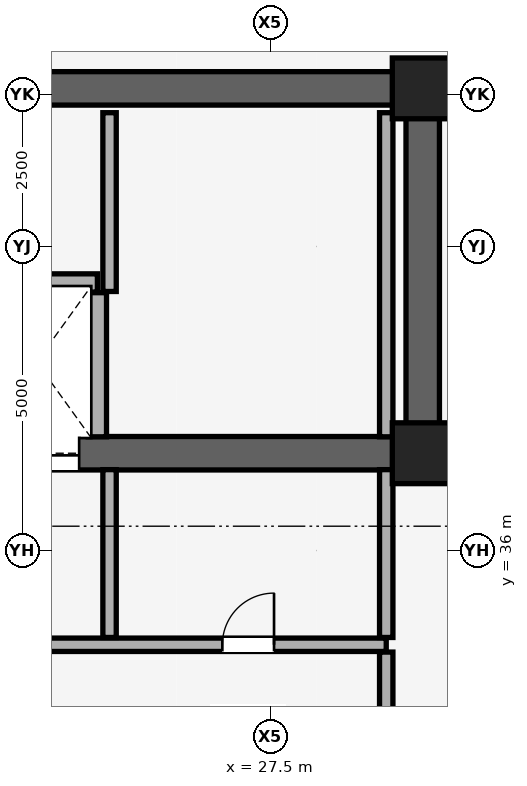
"""IFC4 building model, lengths in metres.
Left out: names, types, materials, properties, quantities, classifications, styles, units other than length and angle.
Written with IfcOpenShell. Run it as: python <this file> out.ifc"""

import sys

from ifc_helpers import new_model, si_unit, direction, frame, frame_2d, origin, origin_2d, place, context, subcontext, project, spatial, rectangle, extrude, element, fill, save


model = new_model("IFC4")
c1 = context("Model", 3, precision=1e-05, world=origin(), true_north=direction((0.0, 1.0)))
c2 = subcontext(c1, "Body", "Model", "MODEL_VIEW")
j1 = project(units=[si_unit("LENGTHUNIT", "METRE"), si_unit("PLANEANGLEUNIT", "RADIAN")], contexts=[c1])
p1 = place(None, origin())
s1 = spatial("IfcSite", under=j1, at=p1, CompositionType="ELEMENT")
p2 = place(p1, origin())
s2 = spatial("IfcBuilding", under=s1, at=p2, CompositionType="ELEMENT")
p3 = place(p2, frame((0.0, 0.0, 147.8)))
s3 = spatial("IfcBuildingStorey", under=s2, at=p3, CompositionType="ELEMENT", Elevation=147.8)
for number, where, z_axis, x_axis in (
    (1, (30.0, 37.6, 0.0), (0.0, 0.0, 1.0), (1.0, 0.0, 0.0)),
    (2, (30.0, 43.6, 0.0), (0.0, 0.0, 1.0), (1.0, 0.0, 0.0)),
):
    element("IfcColumn", number, at=place(p3, frame(where, z_axis=z_axis, x_axis=x_axis)), inside=s3, PredefinedType="COLUMN", context=c2, shape_type="SweptSolid", body=[
        extrude(rectangle(XDim=1.0, YDim=1.0, at=origin_2d()), origin(), (0.0, 0.0, 1.0), 6.6),
    ])
p4 = place(p3, frame((11.0, 43.6, 0.0), z_axis=(0.0, 0.0, 1.0), x_axis=(1.0, 0.0, 0.0)))
e3 = element("IfcWall", 3, at=p4, inside=s3, PredefinedType="SHEAR", context=c2, shape_type="SweptSolid", body=[
    extrude(rectangle(XDim=19.0, YDim=0.55, at=frame_2d((9.5, 0.0))), origin(), (0.0, 0.0, 1.0), 6.4),
])
p5 = place(p3, frame((30.0, 37.6, 0.0), z_axis=(0.0, 0.0, 1.0), x_axis=(0.0, 1.0, 0.0)))
e4 = element("IfcWall", 4, at=p5, inside=s3, PredefinedType="SHEAR", context=c2, shape_type="SweptSolid", body=[
    extrude(rectangle(XDim=6.0, YDim=0.55, at=frame_2d((3.0, 0.0))), origin(), (0.0, 0.0, 1.0), 6.4),
])
p6 = place(p3, frame((11.0, 37.6, 0.0), z_axis=(0.0, 0.0, 1.0), x_axis=(1.0, 0.0, 0.0)))
e5 = element("IfcWall", 5, at=p6, inside=s3, PredefinedType="SHEAR", context=c2, shape_type="SweptSolid", body=[
    extrude(rectangle(XDim=19.0, YDim=0.55, at=frame_2d((9.5, 0.0))), origin(), (0.0, 0.0, 1.0), 6.4),
])
p7 = place(p6, frame((1.06, 0.0, 0.0)))
e6 = element("IfcOpeningElement", 6, at=p7, cuts=e5, PredefinedType="OPENING", context=c2, shape_type="SweptSolid", body=[
    extrude(rectangle(XDim=1.15, YDim=2.2, at=frame_2d((0.575, 1.1))), frame((0.0, 0.285, 0.0), z_axis=(0.0, -1.0, 0.0), x_axis=(1.0, 0.0, 0.0)), (0.0, 0.0, 1.0), 0.57),
])
p8 = place(p6, frame((9.55, 0.0, 0.0)))
e7 = element("IfcOpeningElement", 7, at=p8, cuts=e5, PredefinedType="OPENING", context=c2, shape_type="SweptSolid", body=[
    extrude(rectangle(XDim=1.4, YDim=2.35, at=frame_2d((0.7, 1.175))), frame((0.0, 0.285, 0.0), z_axis=(0.0, -1.0, 0.0), x_axis=(1.0, 0.0, 0.0)), (0.0, 0.0, 1.0), 0.57),
])
p9 = place(p6, frame((11.95, 0.0, 0.0)))
e8 = element("IfcOpeningElement", 8, at=p9, cuts=e5, PredefinedType="OPENING", context=c2, shape_type="SweptSolid", body=[
    extrude(rectangle(XDim=1.4, YDim=2.35, at=frame_2d((0.7, 1.175))), frame((0.0, 0.285, 0.0), z_axis=(0.0, -1.0, 0.0), x_axis=(1.0, 0.0, 0.0)), (0.0, 0.0, 1.0), 0.57),
])
p10 = place(p3, frame((16.64, 34.45, 0.0), z_axis=(0.0, 0.0, 1.0), x_axis=(1.0, 0.0, 0.0)))
e9 = element("IfcWall", 9, at=p10, inside=s3, PredefinedType="SOLIDWALL", context=c2, shape_type="SweptSolid", body=[
    extrude(rectangle(XDim=12.76, YDim=0.22, at=frame_2d((6.38, 0.0))), origin(), (0.0, 0.0, 1.0), 5.975),
])
p11 = place(p10, frame((5.21, 0.0, 0.0)))
e10 = element("IfcOpeningElement", 10, at=p11, cuts=e9, PredefinedType="OPENING", context=c2, shape_type="SweptSolid", body=[
    extrude(rectangle(XDim=1.2, YDim=2.25, at=frame_2d((0.6, 1.125))), frame((0.0, 0.12, 0.0), z_axis=(0.0, -1.0, 0.0), x_axis=(1.0, 0.0, 0.0)), (0.0, 0.0, 1.0), 0.24),
])
p12 = place(p10, frame((10.065, 0.0, 0.0)))
e11 = element("IfcOpeningElement", 11, at=p12, cuts=e9, PredefinedType="OPENING", context=c2, shape_type="SweptSolid", body=[
    extrude(rectangle(XDim=0.85, YDim=2.01, at=frame_2d((0.425, 1.005))), frame((0.0, 0.12, 0.0), z_axis=(0.0, -1.0, 0.0), x_axis=(1.0, 0.0, 0.0)), (0.0, 0.0, 1.0), 0.24),
])
p13 = place(p10, frame((1.25, 0.0, 0.0)))
e12 = element("IfcOpeningElement", 12, at=p13, cuts=e9, PredefinedType="OPENING", context=c2, shape_type="SweptSolid", body=[
    extrude(rectangle(XDim=0.85, YDim=2.01, at=frame_2d((0.425, 1.005))), frame((0.0, 0.12, 0.0), z_axis=(0.0, -1.0, 0.0), x_axis=(1.0, 0.0, 0.0)), (0.0, 0.0, 1.0), 0.24),
])
p14 = place(p3, frame((20.25, 40.4, 0.0), z_axis=(0.0, 0.0, 1.0), x_axis=(1.0, 0.0, 0.0)))
e13 = element("IfcWall", 13, at=p14, inside=s3, PredefinedType="SOLIDWALL", context=c2, shape_type="SweptSolid", body=[
    extrude(rectangle(XDim=4.4, YDim=0.3, at=frame_2d((2.2, 0.0))), origin(), (0.0, 0.0, 1.0), 6.4),
])
p15 = place(p3, frame((24.65, 37.87, 0.0), z_axis=(0.0, 0.0, 1.0), x_axis=(0.0, 1.0, 0.0)))
e14 = element("IfcWall", 14, at=p15, inside=s3, PredefinedType="SOLIDWALL", context=c2, shape_type="SweptSolid", body=[
    extrude(rectangle(XDim=2.37, YDim=0.3, at=frame_2d((1.185, 0.0))), origin(), (0.0, 0.0, 1.0), 6.4),
])
p16 = place(p3, frame((24.85, 34.57, 0.0), z_axis=(0.0, 0.0, 1.0), x_axis=(0.0, 1.0, 0.0)))
e15 = element("IfcWall", 15, at=p16, inside=s3, PredefinedType="SOLIDWALL", context=c2, shape_type="SweptSolid", body=[
    extrude(rectangle(XDim=2.76, YDim=0.22, at=frame_2d((1.38, 0.0))), origin(), (0.0, 0.0, 1.0), 6.4),
])
p17 = place(p3, frame((24.85, 40.26, 0.0), z_axis=(0.0, 0.0, 1.0), x_axis=(0.0, 1.0, 0.0)))
e16 = element("IfcWall", 16, at=p17, inside=s3, PredefinedType="SOLIDWALL", context=c2, shape_type="SweptSolid", body=[
    extrude(rectangle(XDim=2.94, YDim=0.22, at=frame_2d((1.47, 0.0))), origin(), (0.0, 0.0, 1.0), 6.4),
])
p18 = place(p3, frame((29.4, 32.92, 0.0), z_axis=(0.0, 0.0, 1.0), x_axis=(0.0, 1.0, 0.0)))
e17 = element("IfcWall", 17, at=p18, inside=s3, PredefinedType="SOLIDWALL", context=c2, shape_type="SweptSolid", body=[
    extrude(rectangle(XDim=1.41, YDim=0.22, at=frame_2d((0.705, 0.0))), origin(), (0.0, 0.0, 1.0), 6.4),
])
p19 = place(p3, frame((29.4, 34.57, 0.0), z_axis=(0.0, 0.0, 1.0), x_axis=(0.0, 1.0, 0.0)))
e18 = element("IfcWall", 18, at=p19, inside=s3, PredefinedType="SOLIDWALL", context=c2, shape_type="SweptSolid", body=[
    extrude(rectangle(XDim=2.76, YDim=0.22, at=frame_2d((1.38, 0.0))), origin(), (0.0, 0.0, 1.0), 6.4),
])
p20 = place(p3, frame((29.4, 37.87, 0.0), z_axis=(0.0, 0.0, 1.0), x_axis=(0.0, 1.0, 0.0)))
e19 = element("IfcWall", 19, at=p20, inside=s3, PredefinedType="SOLIDWALL", context=c2, shape_type="SweptSolid", body=[
    extrude(rectangle(XDim=5.33, YDim=0.22, at=frame_2d((2.665, 0.0))), origin(), (0.0, 0.0, 1.0), 6.4),
])
p21 = place(p12, origin())
e20 = element("IfcDoor", 20, at=p21, inside=s3, OperationType="SINGLE_SWING_RIGHT", PredefinedType="DOOR", context=c2, shape_type="SweptSolid", body=[
    extrude(rectangle(XDim=0.85, YDim=2.01, at=frame_2d((0.425, 1.005))), frame((0.0, 0.025, 0.0), z_axis=(0.0, -1.0, 0.0), x_axis=(1.0, 0.0, 0.0)), (0.0, 0.0, 1.0), 0.05),
])
fill(e11, e20)
p22 = place(p9, origin())
e21 = element("IfcDoor", 21, at=p22, inside=s3, OperationType="DOUBLE_DOOR_SLIDING", PredefinedType="DOOR", context=c2, shape_type="SweptSolid", body=[
    extrude(rectangle(XDim=1.4, YDim=2.35, at=frame_2d((0.7, 1.175))), frame((0.0, 0.025, 0.0), z_axis=(0.0, -1.0, 0.0), x_axis=(1.0, 0.0, 0.0)), (0.0, 0.0, 1.0), 0.05),
])
fill(e8, e21)
save(model, sys.argv[1])
